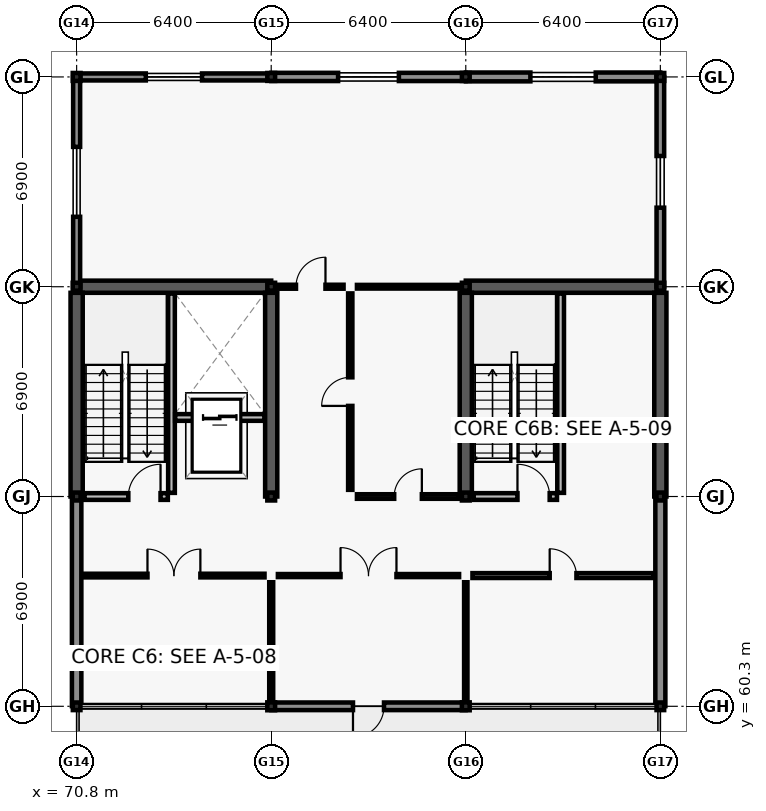
"""IFC4 building model, lengths in metres.
Left out: names, types, materials, properties, quantities, classifications, styles, units other than length and angle.
Written with IfcOpenShell. Run it as: python <this file> out.ifc"""

import sys

from ifc_helpers import new_model, si_unit, direction, frame, frame_2d, origin, origin_2d, place, context, subcontext, project, spatial, rectangle, hollow_rectangle, i_section, extrude, element, fill, save


model = new_model("IFC4")
c1 = context("Model", 3, precision=1e-05, world=origin(), true_north=direction((0.0, 1.0)))
c2 = subcontext(c1, "Body", "Model", "MODEL_VIEW")
j1 = project(units=[si_unit("LENGTHUNIT", "METRE"), si_unit("PLANEANGLEUNIT", "RADIAN")], contexts=[c1])
p1 = place(None, origin())
s1 = spatial("IfcSite", under=j1, at=p1, CompositionType="ELEMENT")
p2 = place(p1, origin())
s2 = spatial("IfcBuilding", under=s1, at=p2, CompositionType="ELEMENT")
p3 = place(p2, frame((0.0, 0.0, 17.4)))
s3 = spatial("IfcBuildingStorey", under=s2, at=p3, CompositionType="ELEMENT", Elevation=17.4)
p4 = place(p3, frame((70.8, 60.3, 0.0), z_axis=(0.0, 0.0, 1.0), x_axis=(1.0, 0.0, 0.0)))
e1 = element("IfcColumn", 1, at=p4, inside=s3, PredefinedType="COLUMN", context=c2, shape_type="SweptSolid", body=[
    extrude(hollow_rectangle(XDim=0.25, YDim=0.25, WallThickness=0.012, at=origin_2d()), origin(), (0.0, 0.0, 1.0), 3.9),
])
for number, where, z_axis, x_axis in (
    (2, (70.8, 67.2, 0.0), (0.0, 0.0, 1.0), (1.0, 0.0, 0.0)),
    (3, (70.8, 74.1, 0.0), (0.0, 0.0, 1.0), (1.0, 0.0, 0.0)),
    (4, (70.8, 81.0, 0.0), (0.0, 0.0, 1.0), (1.0, 0.0, 0.0)),
    (5, (77.2, 60.3, 0.0), (0.0, 0.0, 1.0), (1.0, 0.0, 0.0)),
    (6, (77.2, 67.2, 0.0), (0.0, 0.0, 1.0), (1.0, 0.0, 0.0)),
    (7, (77.2, 74.1, 0.0), (0.0, 0.0, 1.0), (1.0, 0.0, 0.0)),
    (8, (77.2, 81.0, 0.0), (0.0, 0.0, 1.0), (1.0, 0.0, 0.0)),
    (9, (83.6, 60.3, 0.0), (0.0, 0.0, 1.0), (1.0, 0.0, 0.0)),
    (10, (83.6, 67.2, 0.0), (0.0, 0.0, 1.0), (1.0, 0.0, 0.0)),
    (11, (83.6, 74.1, 0.0), (0.0, 0.0, 1.0), (1.0, 0.0, 0.0)),
    (12, (83.6, 81.0, 0.0), (0.0, 0.0, 1.0), (1.0, 0.0, 0.0)),
):
    element("IfcColumn", number, at=place(p3, frame(where, z_axis=z_axis, x_axis=x_axis)), inside=s3, PredefinedType="COLUMN", context=c2, shape_type="SweptSolid", body=[
        extrude(i_section(OverallWidth=0.256, OverallDepth=0.26, WebThickness=0.01, FlangeThickness=0.017, FilletRadius=0.013, at=origin_2d()), origin(), (0.0, 0.0, 1.0), 3.9),
    ])
p5 = place(p3, frame((90.0, 60.3, 0.0), z_axis=(0.0, 0.0, 1.0), x_axis=(1.0, 0.0, 0.0)))
e13 = element("IfcColumn", 13, at=p5, inside=s3, PredefinedType="COLUMN", context=c2, shape_type="SweptSolid", body=[
    extrude(hollow_rectangle(XDim=0.25, YDim=0.25, WallThickness=0.012, at=origin_2d()), origin(), (0.0, 0.0, 1.0), 3.9),
])
for number, where, z_axis, x_axis in (
    (14, (90.0, 67.2, 0.0), (0.0, 0.0, 1.0), (1.0, 0.0, 0.0)),
    (15, (90.0, 74.1, 0.0), (0.0, 0.0, 1.0), (1.0, 0.0, 0.0)),
    (16, (90.0, 81.0, 0.0), (0.0, 0.0, 1.0), (1.0, 0.0, 0.0)),
):
    element("IfcColumn", number, at=place(p3, frame(where, z_axis=z_axis, x_axis=x_axis)), inside=s3, PredefinedType="COLUMN", context=c2, shape_type="SweptSolid", body=[
        extrude(i_section(OverallWidth=0.256, OverallDepth=0.26, WebThickness=0.01, FlangeThickness=0.017, FilletRadius=0.013, at=origin_2d()), origin(), (0.0, 0.0, 1.0), 3.9),
    ])
p6 = place(p3, frame((70.8, 74.1, 0.0), z_axis=(0.0, 0.0, 1.0), x_axis=(1.0, 0.0, 0.0)))
e17 = element("IfcWall", 17, at=p6, inside=s3, PredefinedType="SHEAR", context=c2, shape_type="SweptSolid", body=[
    extrude(rectangle(XDim=6.4, YDim=0.4, at=frame_2d((3.2, 0.0))), origin(), (0.0, 0.0, 1.0), 3.66),
])
for number, where, z_axis, x_axis in (
    (18, (70.8, 67.2, 0.0), (0.0, 0.0, 1.0), (0.0, 1.0, 0.0)),
    (19, (77.2, 67.2, 0.0), (0.0, 0.0, 1.0), (0.0, 1.0, 0.0)),
):
    element("IfcWall", number, at=place(p3, frame(where, z_axis=z_axis, x_axis=x_axis)), inside=s3, PredefinedType="SHEAR", context=c2, shape_type="SweptSolid", body=[
        extrude(rectangle(XDim=6.7, YDim=0.4, at=frame_2d((3.35, 0.0))), origin(), (0.0, 0.0, 1.0), 3.66),
    ])
p7 = place(p3, frame((83.6, 74.1, 0.0), z_axis=(0.0, 0.0, 1.0), x_axis=(1.0, 0.0, 0.0)))
e20 = element("IfcWall", 20, at=p7, inside=s3, PredefinedType="SHEAR", context=c2, shape_type="SweptSolid", body=[
    extrude(rectangle(XDim=6.4, YDim=0.4, at=frame_2d((3.2, 0.0))), origin(), (0.0, 0.0, 1.0), 3.66),
])
for number, where, z_axis, x_axis in (
    (21, (83.6, 67.2, 0.0), (0.0, 0.0, 1.0), (0.0, 1.0, 0.0)),
    (22, (90.0, 67.2, 0.0), (0.0, 0.0, 1.0), (0.0, 1.0, 0.0)),
):
    element("IfcWall", number, at=place(p3, frame(where, z_axis=z_axis, x_axis=x_axis)), inside=s3, PredefinedType="SHEAR", context=c2, shape_type="SweptSolid", body=[
        extrude(rectangle(XDim=6.7, YDim=0.4, at=frame_2d((3.35, 0.0))), origin(), (0.0, 0.0, 1.0), 3.66),
    ])
p8 = place(p3, frame((70.805, 81.0, 0.0), z_axis=(0.0, 0.0, 1.0), x_axis=(1.0, 0.0, 0.0)))
e23 = element("IfcWall", 23, at=p8, inside=s3, PredefinedType="SOLIDWALL", context=c2, shape_type="SweptSolid", body=[
    extrude(rectangle(XDim=6.39, YDim=0.23, at=frame_2d((3.195, 0.0))), origin(), (0.0, 0.0, 1.0), 3.02),
])
p9 = place(p8, frame((2.27, 0.0, 0.8)))
e24 = element("IfcOpeningElement", 24, at=p9, cuts=e23, PredefinedType="OPENING", context=c2, shape_type="SweptSolid", body=[
    extrude(rectangle(XDim=1.85, YDim=1.55, at=frame_2d((0.925, 0.775))), frame((0.0, 0.125, 0.0), z_axis=(0.0, -1.0, 0.0), x_axis=(1.0, 0.0, 0.0)), (0.0, 0.0, 1.0), 0.25),
])
p10 = place(p3, frame((83.595, 60.3, 0.0), z_axis=(0.0, 0.0, 1.0), x_axis=(-1.0, 0.0, 0.0)))
e25 = element("IfcWall", 25, at=p10, inside=s3, PredefinedType="SOLIDWALL", context=c2, shape_type="SweptSolid", body=[
    extrude(rectangle(XDim=6.39, YDim=0.25, at=frame_2d((3.195, 0.0))), origin(), (0.0, 0.0, 1.0), 3.02),
])
p11 = place(p10, frame((2.685, 0.0, 0.0)))
e26 = element("IfcOpeningElement", 26, at=p11, cuts=e25, PredefinedType="OPENING", context=c2, shape_type="SweptSolid", body=[
    extrude(rectangle(XDim=1.02, YDim=2.14, at=frame_2d((0.51, 1.07))), frame((0.0, 0.135, 0.0), z_axis=(0.0, -1.0, 0.0), x_axis=(1.0, 0.0, 0.0)), (0.0, 0.0, 1.0), 0.27),
])
p12 = place(p3, frame((77.205, 81.0, 0.0), z_axis=(0.0, 0.0, 1.0), x_axis=(1.0, 0.0, 0.0)))
e27 = element("IfcWall", 27, at=p12, inside=s3, PredefinedType="SOLIDWALL", context=c2, shape_type="SweptSolid", body=[
    extrude(rectangle(XDim=6.39, YDim=0.27, at=frame_2d((3.195, 0.0))), origin(), (0.0, 0.0, 1.0), 3.02),
])
p13 = place(p12, frame((2.195, 0.0, 0.8)))
e28 = element("IfcOpeningElement", 28, at=p13, cuts=e27, PredefinedType="OPENING", context=c2, shape_type="SweptSolid", body=[
    extrude(rectangle(XDim=2.0, YDim=1.55, at=frame_2d((1.0, 0.775))), frame((0.0, 0.145, 0.0), z_axis=(0.0, -1.0, 0.0), x_axis=(1.0, 0.0, 0.0)), (0.0, 0.0, 1.0), 0.29),
])
p14 = place(p3, frame((83.605, 81.0, 0.0), z_axis=(0.0, 0.0, 1.0), x_axis=(1.0, 0.0, 0.0)))
e29 = element("IfcWall", 29, at=p14, inside=s3, PredefinedType="SOLIDWALL", context=c2, shape_type="SweptSolid", body=[
    extrude(rectangle(XDim=6.39, YDim=0.29, at=frame_2d((3.195, 0.0))), origin(), (0.0, 0.0, 1.0), 3.02),
])
p15 = place(p14, frame((2.12, 0.0, 0.8)))
e30 = element("IfcOpeningElement", 30, at=p15, cuts=e29, PredefinedType="OPENING", context=c2, shape_type="SweptSolid", body=[
    extrude(rectangle(XDim=2.15, YDim=1.55, at=frame_2d((1.075, 0.775))), frame((0.0, 0.155, 0.0), z_axis=(0.0, -1.0, 0.0), x_axis=(1.0, 0.0, 0.0)), (0.0, 0.0, 1.0), 0.31),
])
p16 = place(p3, frame((70.8, 60.305, 0.0), z_axis=(0.0, 0.0, 1.0), x_axis=(0.0, 1.0, 0.0)))
e31 = element("IfcWall", 31, at=p16, inside=s3, PredefinedType="SOLIDWALL", context=c2, shape_type="SweptSolid", body=[
    extrude(rectangle(XDim=6.89, YDim=0.31, at=frame_2d((3.445, 0.0))), origin(), (0.0, 0.0, 1.0), 3.02),
])
p17 = place(p3, frame((90.0, 67.195, 0.0), z_axis=(0.0, 0.0, 1.0), x_axis=(0.0, -1.0, 0.0)))
e32 = element("IfcWall", 32, at=p17, inside=s3, PredefinedType="SOLIDWALL", context=c2, shape_type="SweptSolid", body=[
    extrude(rectangle(XDim=6.89, YDim=0.33, at=frame_2d((3.445, 0.0))), origin(), (0.0, 0.0, 1.0), 3.02),
])
p18 = place(p3, frame((70.8, 74.105, 0.0), z_axis=(0.0, 0.0, 1.0), x_axis=(0.0, 1.0, 0.0)))
e33 = element("IfcWall", 33, at=p18, inside=s3, PredefinedType="SOLIDWALL", context=c2, shape_type="SweptSolid", body=[
    extrude(rectangle(XDim=6.89, YDim=0.23, at=frame_2d((3.445, 0.0))), origin(), (0.0, 0.0, 1.0), 3.02),
])
p19 = place(p18, frame((2.295, 0.0, 0.8)))
e34 = element("IfcOpeningElement", 34, at=p19, cuts=e33, PredefinedType="OPENING", context=c2, shape_type="SweptSolid", body=[
    extrude(rectangle(XDim=2.3, YDim=1.55, at=frame_2d((1.15, 0.775))), frame((0.0, 0.125, 0.0), z_axis=(0.0, -1.0, 0.0), x_axis=(1.0, 0.0, 0.0)), (0.0, 0.0, 1.0), 0.25),
])
p20 = place(p3, frame((90.0, 80.995, 0.0), z_axis=(0.0, 0.0, 1.0), x_axis=(0.0, -1.0, 0.0)))
e35 = element("IfcWall", 35, at=p20, inside=s3, PredefinedType="SOLIDWALL", context=c2, shape_type="SweptSolid", body=[
    extrude(rectangle(XDim=6.89, YDim=0.25, at=frame_2d((3.445, 0.0))), origin(), (0.0, 0.0, 1.0), 3.02),
])
p21 = place(p20, frame((2.595, 0.0, 0.8)))
e36 = element("IfcOpeningElement", 36, at=p21, cuts=e35, PredefinedType="OPENING", context=c2, shape_type="SweptSolid", body=[
    extrude(rectangle(XDim=1.7, YDim=1.95, at=frame_2d((0.85, 0.975))), frame((0.0, 0.135, 0.0), z_axis=(0.0, -1.0, 0.0), x_axis=(1.0, 0.0, 0.0)), (0.0, 0.0, 1.0), 0.27),
])
p22 = place(p3, frame((73.92, 67.32, 0.0), z_axis=(0.0, 0.0, 1.0), x_axis=(0.0, 1.0, 0.0)))
e37 = element("IfcWall", 37, at=p22, inside=s3, PredefinedType="SOLIDWALL", context=c2, shape_type="SweptSolid", body=[
    extrude(rectangle(XDim=6.555, YDim=0.22, at=frame_2d((3.277, 0.0))), origin(), (0.0, 0.0, 1.0), 3.66),
])
p23 = place(p3, frame((71.06, 67.2, 0.0), z_axis=(0.0, 0.0, 1.0), x_axis=(1.0, 0.0, 0.0)))
e38 = element("IfcWall", 38, at=p23, inside=s3, PredefinedType="SOLIDWALL", context=c2, shape_type="SweptSolid", body=[
    extrude(rectangle(XDim=2.74, YDim=0.22, at=frame_2d((1.37, 0.0))), origin(), (0.0, 0.0, 1.0), 3.02),
])
p24 = place(p23, frame((1.44, 0.0, 0.0)))
e39 = element("IfcOpeningElement", 39, at=p24, cuts=e38, PredefinedType="OPENING", context=c2, shape_type="SweptSolid", body=[
    extrude(rectangle(XDim=1.06, YDim=2.1, at=frame_2d((0.53, 1.05))), frame((0.0, 0.12, 0.0), z_axis=(0.0, -1.0, 0.0), x_axis=(1.0, 0.0, 0.0)), (0.0, 0.0, 1.0), 0.24),
])
p25 = place(p3, frame((74.04, 69.8, 0.0), z_axis=(0.0, 0.0, 1.0), x_axis=(1.0, 0.0, 0.0)))
e40 = element("IfcWall", 40, at=p25, inside=s3, PredefinedType="SOLIDWALL", context=c2, shape_type="SweptSolid", body=[
    extrude(rectangle(XDim=2.935, YDim=0.22, at=frame_2d((1.468, 0.0))), origin(), (0.0, 0.0, 1.0), 3.66),
])
p26 = place(p25, frame((0.917, 0.0, 0.0)))
e41 = element("IfcOpeningElement", 41, at=p26, cuts=e40, PredefinedType="OPENING", context=c2, shape_type="SweptSolid", body=[
    extrude(rectangle(XDim=1.1, YDim=2.1, at=frame_2d((0.55, 1.05))), frame((0.0, 0.12, 0.0), z_axis=(0.0, -1.0, 0.0), x_axis=(1.0, 0.0, 0.0)), (0.0, 0.0, 1.0), 0.24),
])
p27 = place(p3, frame((86.72, 67.32, 0.0), z_axis=(0.0, 0.0, 1.0), x_axis=(0.0, 1.0, 0.0)))
e42 = element("IfcWall", 42, at=p27, inside=s3, PredefinedType="SOLIDWALL", context=c2, shape_type="SweptSolid", body=[
    extrude(rectangle(XDim=6.555, YDim=0.22, at=frame_2d((3.277, 0.0))), origin(), (0.0, 0.0, 1.0), 3.66),
])
p28 = place(p3, frame((83.86, 67.2, 0.0), z_axis=(0.0, 0.0, 1.0), x_axis=(1.0, 0.0, 0.0)))
e43 = element("IfcWall", 43, at=p28, inside=s3, PredefinedType="SOLIDWALL", context=c2, shape_type="SweptSolid", body=[
    extrude(rectangle(XDim=2.74, YDim=0.22, at=frame_2d((1.37, 0.0))), origin(), (0.0, 0.0, 1.0), 3.02),
])
p29 = place(p28, frame((1.44, 0.0, 0.0)))
e44 = element("IfcOpeningElement", 44, at=p29, cuts=e43, PredefinedType="OPENING", context=c2, shape_type="SweptSolid", body=[
    extrude(rectangle(XDim=1.06, YDim=2.1, at=frame_2d((0.53, 1.05))), frame((0.0, 0.12, 0.0), z_axis=(0.0, -1.0, 0.0), x_axis=(1.0, 0.0, 0.0)), (0.0, 0.0, 1.0), 0.24),
])
p30 = place(p3, frame((77.2, 60.52, 0.0), z_axis=(0.0, 0.0, 1.0), x_axis=(0.0, 1.0, 0.0)))
e45 = element("IfcWall", 45, at=p30, inside=s3, PredefinedType="PARTITIONING", context=c2, shape_type="SweptSolid", body=[
    extrude(rectangle(XDim=3.86, YDim=0.13, at=frame_2d((1.93, 0.0))), origin(), (0.0, 0.0, 1.0), 3.0),
])
p31 = place(p3, frame((71.02, 64.6, 0.0), z_axis=(0.0, 0.0, 1.0), x_axis=(1.0, 0.0, 0.0)))
e46 = element("IfcWall", 46, at=p31, inside=s3, PredefinedType="PARTITIONING", context=c2, shape_type="SweptSolid", body=[
    extrude(rectangle(XDim=5.96, YDim=0.12, at=frame_2d((2.98, 0.0))), origin(), (0.0, 0.0, 1.0), 3.0),
])
p32 = place(p31, frame((2.11, 0.0, 0.0)))
e47 = element("IfcOpeningElement", 47, at=p32, cuts=e46, PredefinedType="OPENING", context=c2, shape_type="SweptSolid", body=[
    extrude(rectangle(XDim=1.74, YDim=2.2, at=frame_2d((0.87, 1.1))), frame((0.0, 0.07, 0.0), z_axis=(0.0, -1.0, 0.0), x_axis=(1.0, 0.0, 0.0)), (0.0, 0.0, 1.0), 0.14),
])
p33 = place(p3, frame((83.6, 60.52, 0.0), z_axis=(0.0, 0.0, 1.0), x_axis=(0.0, 1.0, 0.0)))
e48 = element("IfcWall", 48, at=p33, inside=s3, PredefinedType="PARTITIONING", context=c2, shape_type="SweptSolid", body=[
    extrude(rectangle(XDim=3.86, YDim=0.11, at=frame_2d((1.93, 0.0))), origin(), (0.0, 0.0, 1.0), 3.0),
])
p34 = place(p3, frame((77.42, 64.6, 0.0), z_axis=(0.0, 0.0, 1.0), x_axis=(1.0, 0.0, 0.0)))
e49 = element("IfcWall", 49, at=p34, inside=s3, PredefinedType="PARTITIONING", context=c2, shape_type="SweptSolid", body=[
    extrude(rectangle(XDim=5.96, YDim=0.1, at=frame_2d((2.98, 0.0))), origin(), (0.0, 0.0, 1.0), 3.0),
])
p35 = place(p34, frame((2.06, 0.0, 0.0)))
e50 = element("IfcOpeningElement", 50, at=p35, cuts=e49, PredefinedType="OPENING", context=c2, shape_type="SweptSolid", body=[
    extrude(rectangle(XDim=1.84, YDim=2.22, at=frame_2d((0.92, 1.11))), frame((0.0, 0.06, 0.0), z_axis=(0.0, -1.0, 0.0), x_axis=(1.0, 0.0, 0.0)), (0.0, 0.0, 1.0), 0.12),
])
p36 = place(p3, frame((83.82, 64.6, 0.0), z_axis=(0.0, 0.0, 1.0), x_axis=(1.0, 0.0, 0.0)))
e51 = element("IfcWall", 51, at=p36, inside=s3, PredefinedType="PARTITIONING", context=c2, shape_type="SweptSolid", body=[
    extrude(rectangle(XDim=5.96, YDim=0.16, at=frame_2d((2.98, 0.0))), origin(), (0.0, 0.0, 1.0), 3.0),
])
p37 = place(p36, frame((2.54, 0.0, 0.0)))
e52 = element("IfcOpeningElement", 52, at=p37, cuts=e51, PredefinedType="OPENING", context=c2, shape_type="SweptSolid", body=[
    extrude(rectangle(XDim=0.88, YDim=2.04, at=frame_2d((0.44, 1.02))), frame((0.0, 0.09, 0.0), z_axis=(0.0, -1.0, 0.0), x_axis=(1.0, 0.0, 0.0)), (0.0, 0.0, 1.0), 0.18),
])
p38 = place(p3, frame((80.02, 67.2, 0.0), z_axis=(0.0, 0.0, 1.0), x_axis=(1.0, 0.0, 0.0)))
e53 = element("IfcWall", 53, at=p38, inside=s3, PredefinedType="PARTITIONING", context=c2, shape_type="SweptSolid", body=[
    extrude(rectangle(XDim=3.36, YDim=0.15, at=frame_2d((1.68, 0.0))), origin(), (0.0, 0.0, 1.0), 3.0),
])
p39 = place(p38, frame((1.225, 0.0, 0.0)))
e54 = element("IfcOpeningElement", 54, at=p39, cuts=e53, PredefinedType="OPENING", context=c2, shape_type="SweptSolid", body=[
    extrude(rectangle(XDim=0.91, YDim=2.06, at=frame_2d((0.455, 1.03))), frame((0.0, 0.085, 0.0), z_axis=(0.0, -1.0, 0.0), x_axis=(1.0, 0.0, 0.0)), (0.0, 0.0, 1.0), 0.17),
])
p40 = place(p3, frame((79.8, 67.42, 0.0), z_axis=(0.0, 0.0, 1.0), x_axis=(0.0, 1.0, 0.0)))
e55 = element("IfcWall", 55, at=p40, inside=s3, PredefinedType="PARTITIONING", context=c2, shape_type="SweptSolid", body=[
    extrude(rectangle(XDim=6.46, YDim=0.14, at=frame_2d((3.23, 0.0))), origin(), (0.0, 0.0, 1.0), 3.0),
])
p41 = place(p40, frame((2.76, 0.0, 0.0)))
e56 = element("IfcOpeningElement", 56, at=p41, cuts=e55, PredefinedType="OPENING", context=c2, shape_type="SweptSolid", body=[
    extrude(rectangle(XDim=0.94, YDim=2.08, at=frame_2d((0.47, 1.04))), frame((0.0, 0.08, 0.0), z_axis=(0.0, -1.0, 0.0), x_axis=(1.0, 0.0, 0.0)), (0.0, 0.0, 1.0), 0.16),
])
p42 = place(p3, frame((77.42, 74.1, 0.0), z_axis=(0.0, 0.0, 1.0), x_axis=(1.0, 0.0, 0.0)))
e57 = element("IfcWall", 57, at=p42, inside=s3, PredefinedType="PARTITIONING", context=c2, shape_type="SweptSolid", body=[
    extrude(rectangle(XDim=2.16, YDim=0.13, at=frame_2d((1.08, 0.0))), origin(), (0.0, 0.0, 1.0), 3.0),
])
p43 = place(p42, frame((0.595, 0.0, 0.0)))
e58 = element("IfcOpeningElement", 58, at=p43, cuts=e57, PredefinedType="OPENING", context=c2, shape_type="SweptSolid", body=[
    extrude(rectangle(XDim=0.97, YDim=2.1, at=frame_2d((0.485, 1.05))), frame((0.0, 0.075, 0.0), z_axis=(0.0, -1.0, 0.0), x_axis=(1.0, 0.0, 0.0)), (0.0, 0.0, 1.0), 0.15),
])
p44 = place(p3, frame((80.02, 74.1, 0.0), z_axis=(0.0, 0.0, 1.0), x_axis=(1.0, 0.0, 0.0)))
e59 = element("IfcWall", 59, at=p44, inside=s3, PredefinedType="PARTITIONING", context=c2, shape_type="SweptSolid", body=[
    extrude(rectangle(XDim=3.36, YDim=0.12, at=frame_2d((1.68, 0.0))), origin(), (0.0, 0.0, 1.0), 3.0),
])
p45 = place(p9, origin())
e60 = element("IfcWindow", 60, at=p45, inside=s3, PartitioningType="DOUBLE_PANEL_VERTICAL", PredefinedType="WINDOW", context=c2, shape_type="SweptSolid", body=[
    extrude(rectangle(XDim=1.85, YDim=1.55, at=frame_2d((0.925, 0.775))), frame((0.0, 0.03, 0.0), z_axis=(0.0, -1.0, 0.0), x_axis=(1.0, 0.0, 0.0)), (0.0, 0.0, 1.0), 0.06),
])
fill(e24, e60)
p46 = place(p11, origin())
e61 = element("IfcDoor", 61, at=p46, inside=s3, OperationType="SINGLE_SWING_RIGHT", PredefinedType="DOOR", context=c2, shape_type="SweptSolid", body=[
    extrude(rectangle(XDim=1.02, YDim=2.14, at=frame_2d((0.51, 1.07))), frame((0.0, 0.025, 0.0), z_axis=(0.0, -1.0, 0.0), x_axis=(1.0, 0.0, 0.0)), (0.0, 0.0, 1.0), 0.05),
])
fill(e26, e61)
p47 = place(p13, origin())
e62 = element("IfcWindow", 62, at=p47, inside=s3, PartitioningType="DOUBLE_PANEL_VERTICAL", PredefinedType="WINDOW", context=c2, shape_type="SweptSolid", body=[
    extrude(rectangle(XDim=2.0, YDim=1.55, at=frame_2d((1.0, 0.775))), frame((0.0, 0.03, 0.0), z_axis=(0.0, -1.0, 0.0), x_axis=(1.0, 0.0, 0.0)), (0.0, 0.0, 1.0), 0.06),
])
fill(e28, e62)
p48 = place(p15, origin())
e63 = element("IfcWindow", 63, at=p48, inside=s3, PartitioningType="DOUBLE_PANEL_VERTICAL", PredefinedType="WINDOW", context=c2, shape_type="SweptSolid", body=[
    extrude(rectangle(XDim=2.15, YDim=1.55, at=frame_2d((1.075, 0.775))), frame((0.0, 0.03, 0.0), z_axis=(0.0, -1.0, 0.0), x_axis=(1.0, 0.0, 0.0)), (0.0, 0.0, 1.0), 0.06),
])
fill(e30, e63)
p49 = place(p19, origin())
e64 = element("IfcWindow", 64, at=p49, inside=s3, PartitioningType="DOUBLE_PANEL_VERTICAL", PredefinedType="WINDOW", context=c2, shape_type="SweptSolid", body=[
    extrude(rectangle(XDim=2.3, YDim=1.55, at=frame_2d((1.15, 0.775))), frame((0.0, 0.03, 0.0), z_axis=(0.0, -1.0, 0.0), x_axis=(1.0, 0.0, 0.0)), (0.0, 0.0, 1.0), 0.06),
])
fill(e34, e64)
p50 = place(p21, origin())
e65 = element("IfcWindow", 65, at=p50, inside=s3, PartitioningType="DOUBLE_PANEL_VERTICAL", PredefinedType="WINDOW", context=c2, shape_type="SweptSolid", body=[
    extrude(rectangle(XDim=1.7, YDim=1.95, at=frame_2d((0.85, 0.975))), frame((0.0, 0.03, 0.0), z_axis=(0.0, -1.0, 0.0), x_axis=(1.0, 0.0, 0.0)), (0.0, 0.0, 1.0), 0.06),
])
fill(e36, e65)
p51 = place(p24, origin())
e66 = element("IfcDoor", 66, at=p51, inside=s3, OperationType="SINGLE_SWING_RIGHT", PredefinedType="DOOR", context=c2, shape_type="SweptSolid", body=[
    extrude(rectangle(XDim=1.06, YDim=2.1, at=frame_2d((0.53, 1.05))), frame((0.0, 0.025, 0.0), z_axis=(0.0, -1.0, 0.0), x_axis=(1.0, 0.0, 0.0)), (0.0, 0.0, 1.0), 0.05),
])
fill(e39, e66)
p52 = place(p26, origin())
e67 = element("IfcDoor", 67, at=p52, inside=s3, OperationType="DOUBLE_DOOR_SLIDING", PredefinedType="DOOR", context=c2, shape_type="SweptSolid", body=[
    extrude(rectangle(XDim=1.1, YDim=2.1, at=frame_2d((0.55, 1.05))), frame((0.0, 0.025, 0.0), z_axis=(0.0, -1.0, 0.0), x_axis=(1.0, 0.0, 0.0)), (0.0, 0.0, 1.0), 0.05),
])
fill(e41, e67)
p53 = place(p29, origin())
e68 = element("IfcDoor", 68, at=p53, inside=s3, OperationType="SINGLE_SWING_LEFT", PredefinedType="DOOR", context=c2, shape_type="SweptSolid", body=[
    extrude(rectangle(XDim=1.06, YDim=2.1, at=frame_2d((0.53, 1.05))), frame((0.0, 0.025, 0.0), z_axis=(0.0, -1.0, 0.0), x_axis=(1.0, 0.0, 0.0)), (0.0, 0.0, 1.0), 0.05),
])
fill(e44, e68)
p54 = place(p32, origin())
e69 = element("IfcDoor", 69, at=p54, inside=s3, OperationType="DOUBLE_DOOR_SINGLE_SWING", PredefinedType="DOOR", context=c2, shape_type="SweptSolid", body=[
    extrude(rectangle(XDim=1.74, YDim=2.2, at=frame_2d((0.87, 1.1))), frame((0.0, 0.025, 0.0), z_axis=(0.0, -1.0, 0.0), x_axis=(1.0, 0.0, 0.0)), (0.0, 0.0, 1.0), 0.05),
])
fill(e47, e69)
p55 = place(p35, origin())
e70 = element("IfcDoor", 70, at=p55, inside=s3, OperationType="DOUBLE_DOOR_SINGLE_SWING", PredefinedType="DOOR", context=c2, shape_type="SweptSolid", body=[
    extrude(rectangle(XDim=1.84, YDim=2.22, at=frame_2d((0.92, 1.11))), frame((0.0, 0.025, 0.0), z_axis=(0.0, -1.0, 0.0), x_axis=(1.0, 0.0, 0.0)), (0.0, 0.0, 1.0), 0.05),
])
fill(e50, e70)
p56 = place(p37, origin())
e71 = element("IfcDoor", 71, at=p56, inside=s3, OperationType="SINGLE_SWING_LEFT", PredefinedType="DOOR", context=c2, shape_type="SweptSolid", body=[
    extrude(rectangle(XDim=0.88, YDim=2.04, at=frame_2d((0.44, 1.02))), frame((0.0, 0.025, 0.0), z_axis=(0.0, -1.0, 0.0), x_axis=(1.0, 0.0, 0.0)), (0.0, 0.0, 1.0), 0.05),
])
fill(e52, e71)
p57 = place(p39, origin())
e72 = element("IfcDoor", 72, at=p57, inside=s3, OperationType="SINGLE_SWING_RIGHT", PredefinedType="DOOR", context=c2, shape_type="SweptSolid", body=[
    extrude(rectangle(XDim=0.91, YDim=2.06, at=frame_2d((0.455, 1.03))), frame((0.0, 0.025, 0.0), z_axis=(0.0, -1.0, 0.0), x_axis=(1.0, 0.0, 0.0)), (0.0, 0.0, 1.0), 0.05),
])
fill(e54, e72)
p58 = place(p41, origin())
e73 = element("IfcDoor", 73, at=p58, inside=s3, OperationType="SINGLE_SWING_LEFT", PredefinedType="DOOR", context=c2, shape_type="SweptSolid", body=[
    extrude(rectangle(XDim=0.94, YDim=2.08, at=frame_2d((0.47, 1.04))), frame((0.0, 0.025, 0.0), z_axis=(0.0, -1.0, 0.0), x_axis=(1.0, 0.0, 0.0)), (0.0, 0.0, 1.0), 0.05),
])
fill(e56, e73)
p59 = place(p43, origin())
e74 = element("IfcDoor", 74, at=p59, inside=s3, OperationType="SINGLE_SWING_RIGHT", PredefinedType="DOOR", context=c2, shape_type="SweptSolid", body=[
    extrude(rectangle(XDim=0.97, YDim=2.1, at=frame_2d((0.485, 1.05))), frame((0.0, 0.025, 0.0), z_axis=(0.0, -1.0, 0.0), x_axis=(1.0, 0.0, 0.0)), (0.0, 0.0, 1.0), 0.05),
])
fill(e58, e74)
save(model, sys.argv[1])
